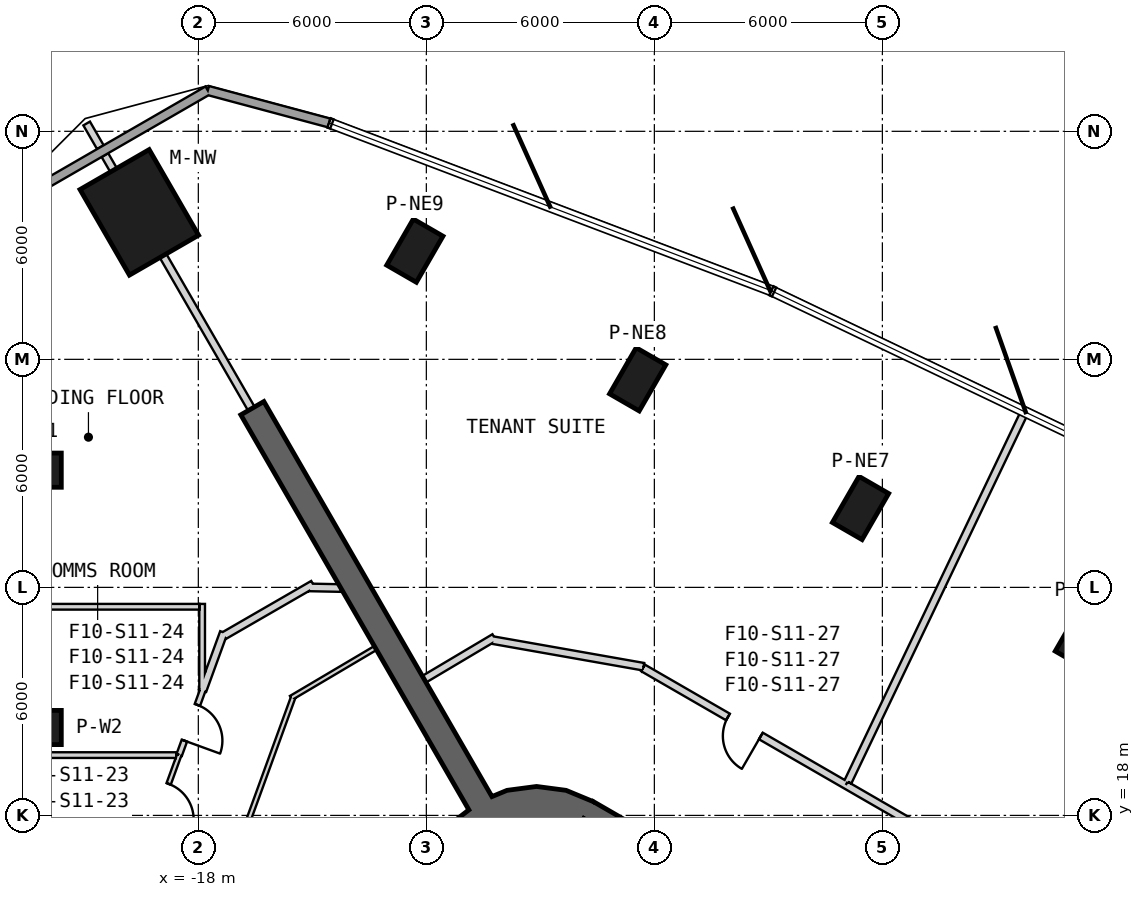
"""IFC4 building model, lengths in metres.
Left out: names, types, materials, properties, quantities, classifications, styles, units other than length and angle.
Written with IfcOpenShell. Run it as: python <this file> out.ifc"""

import sys

from ifc_helpers import new_model, si_unit, direction, frame, frame_2d, origin, origin_2d, place, context, subcontext, project, spatial, polyline, rectangle, outline, extrude, element, fill, save


model = new_model("IFC4")
c1 = context("Model", 3, precision=1e-05, world=origin(), true_north=direction((0.0, 1.0)))
c2 = subcontext(c1, "Body", "Model", "MODEL_VIEW")
j1 = project(units=[si_unit("LENGTHUNIT", "METRE"), si_unit("PLANEANGLEUNIT", "RADIAN")], contexts=[c1])
p1 = place(None, origin())
s1 = spatial("IfcSite", under=j1, at=p1, CompositionType="ELEMENT")
p2 = place(p1, origin())
s2 = spatial("IfcBuilding", under=s1, at=p2, CompositionType="ELEMENT")
p3 = place(p2, frame((0.0, 0.0, 193.2)))
s3 = spatial("IfcBuildingStorey", under=s2, at=p3, CompositionType="ELEMENT", Elevation=193.2)
p4 = place(p3, frame((-19.553, 33.867, 0.0), z_axis=(0.0, 0.0, 1.0), x_axis=(-0.5, 0.866025403784, 0.0)))
e1 = element("IfcColumn", 1, at=p4, inside=s3, PredefinedType="COLUMN", context=c2, shape_type="SweptSolid", body=[
    extrude(rectangle(XDim=2.6, YDim=2.1, at=origin_2d()), origin(), (0.0, 0.0, 1.0), 4.0),
])
for number, where, z_axis, x_axis in (
    (2, (-22.306, 27.084, 0.0), (0.0, 0.0, 1.0), (-1.0, 0.0, 0.0)),
    (3, (-22.306, 20.313, 0.0), (0.0, 0.0, 1.0), (-1.0, 0.0, 0.0)),
    (4, (5.289, 22.703, 0.0), (0.0, 0.0, 1.0), (0.5, 0.866, 0.0)),
    (5, (-0.575, 26.088, 0.0), (0.0, 0.0, 1.0), (0.5, 0.866, 0.0)),
    (6, (-6.439, 29.474, 0.0), (0.0, 0.0, 1.0), (0.5, 0.866, 0.0)),
    (7, (-12.302, 32.859, 0.0), (0.0, 0.0, 1.0), (0.5, 0.866, 0.0)),
):
    element("IfcColumn", number, at=place(p3, frame(where, z_axis=z_axis, x_axis=x_axis)), inside=s3, PredefinedType="COLUMN", context=c2, shape_type="SweptSolid", body=[
        extrude(rectangle(XDim=1.4, YDim=0.9, at=origin_2d()), origin(), (0.0, 0.0, 1.0), 4.0),
    ])
p5 = place(p3, frame((19.475, 2.208, 0.0), z_axis=(0.0, 0.0, 1.0), x_axis=(-0.866028369851, 0.499994862586, 0.0)))
e8 = element("IfcWall", 8, at=p5, inside=s3, PredefinedType="SHEAR", context=c2, shape_type="SweptSolid", body=[
    extrude(rectangle(XDim=31.523, YDim=0.9, at=frame_2d((15.762, 0.0))), origin(), (0.0, 0.0, 1.0), 4.0),
])
p6 = place(p5, frame((7.062, 0.0, 0.0)))
e9 = element("IfcOpeningElement", 9, at=p6, cuts=e8, PredefinedType="OPENING", context=c2, shape_type="SweptSolid", body=[
    extrude(rectangle(XDim=1.2, YDim=2.4, at=frame_2d((0.6, 1.2))), frame((0.0, 0.46, 0.0), z_axis=(0.0, -1.0, 0.0), x_axis=(1.0, 0.0, 0.0)), (0.0, 0.0, 1.0), 0.92),
])
p7 = place(p5, frame((3.612, 0.0, 0.0)))
e10 = element("IfcOpeningElement", 10, at=p7, cuts=e8, PredefinedType="OPENING", context=c2, shape_type="SweptSolid", body=[
    extrude(rectangle(XDim=1.2, YDim=2.4, at=frame_2d((0.6, 1.2))), frame((0.0, 0.46, 0.0), z_axis=(0.0, -1.0, 0.0), x_axis=(1.0, 0.0, 0.0)), (0.0, 0.0, 1.0), 0.92),
])
p8 = place(p5, frame((26.712, 0.0, 0.0)))
e11 = element("IfcOpeningElement", 11, at=p8, cuts=e8, PredefinedType="OPENING", context=c2, shape_type="SweptSolid", body=[
    extrude(rectangle(XDim=1.2, YDim=2.4, at=frame_2d((0.6, 1.2))), frame((0.0, 0.46, 0.0), z_axis=(0.0, -1.0, 0.0), x_axis=(1.0, 0.0, 0.0)), (0.0, 0.0, 1.0), 0.92),
])
p9 = place(p3, origin())
e12 = element("IfcWall", 12, at=p9, inside=s3, PredefinedType="SHEAR", context=c2, shape_type="SweptSolid", body=[
    extrude(outline(polyline([(-7.6, 18.36), (-8.323, 18.659), (-9.1, 18.762), (-9.876, 18.659), (-10.6, 18.36), (-11.221, 17.883), (-11.698, 17.262), (-11.998, 16.538), (-12.1, 15.762), (-11.2, 15.762), (-11.128, 16.305), (-10.919, 16.812), (-10.585, 17.247), (-10.15, 17.58), (-9.644, 17.79), (-9.1, 17.862), (-8.556, 17.79), (-8.05, 17.58), (-7.6, 18.36)])), origin(), (0.0, 0.0, 1.0), 4.0),
])
p10 = place(p3, frame((-10.575, 18.316, 0.0), z_axis=(0.0, 0.0, 1.0), x_axis=(-0.500001138955, 0.866024746207, 0.0)))
e13 = element("IfcWall", 13, at=p10, inside=s3, PredefinedType="SHEAR", context=c2, shape_type="SweptSolid", body=[
    extrude(rectangle(XDim=12.007, YDim=0.7, at=frame_2d((6.003, 0.0))), origin(), (0.0, 0.0, 1.0), 4.0),
])
p11 = place(p3, frame((-14.56, 36.221, 0.0), z_axis=(0.0, 0.0, 1.0), x_axis=(-0.965922648034, 0.258830906222, 0.0)))
e14 = element("IfcWall", 14, at=p11, inside=s3, PredefinedType="SOLIDWALL", context=c2, shape_type="SweptSolid", body=[
    extrude(rectangle(XDim=3.303, YDim=0.24, at=frame_2d((1.652, 0.0))), origin(), (0.0, 0.0, 1.0), 3.7),
])
p12 = place(p3, frame((-17.751, 37.076, 0.0), z_axis=(0.0, 0.0, 1.0), x_axis=(-0.86602503047, -0.5000006466, 0.0)))
e15 = element("IfcWall", 15, at=p12, inside=s3, PredefinedType="SOLIDWALL", context=c2, shape_type="SweptSolid", body=[
    extrude(rectangle(XDim=6.331, YDim=0.24, at=frame_2d((3.165, 0.0))), origin(), (0.0, 0.0, 1.0), 3.7),
])
p13 = place(p3, frame((-13.339, 22.405, 0.0), z_axis=(0.0, 0.0, 1.0), x_axis=(-0.86070028932, -0.509111983718, 0.0)))
e16 = element("IfcWall", 16, at=p13, inside=s3, PredefinedType="PARTITIONING", context=c2, shape_type="SweptSolid", body=[
    extrude(rectangle(XDim=2.579, YDim=0.12, at=frame_2d((1.29, 0.0))), origin(), (0.0, 0.0, 1.0), 3.7),
])
p14 = place(p3, frame((-15.506, 21.103, 0.0), z_axis=(0.0, 0.0, 1.0), x_axis=(-0.342017079535, -0.939693735909, 0.0)))
e17 = element("IfcWall", 17, at=p14, inside=s3, PredefinedType="PARTITIONING", context=c2, shape_type="SweptSolid", body=[
    extrude(rectangle(XDim=4.721, YDim=0.12, at=frame_2d((2.361, 0.0))), origin(), (0.0, 0.0, 1.0), 2.78),
])
p15 = place(p3, frame((-17.331, 22.814, 0.0), z_axis=(0.0, 0.0, 1.0), x_axis=(-0.342055959579, -0.939679583963, 0.0)))
e18 = element("IfcWall", 18, at=p15, inside=s3, PredefinedType="PARTITIONING", context=c2, shape_type="SweptSolid", body=[
    extrude(rectangle(XDim=1.629, YDim=0.2, at=frame_2d((0.814, 0.0))), origin(), (0.0, 0.0, 1.0), 2.78),
])
p16 = place(p3, frame((-14.98, 24.083, 0.0), z_axis=(0.0, 0.0, 1.0), x_axis=(-0.866008795918, -0.500028764566, 0.0)))
e19 = element("IfcWall", 19, at=p16, inside=s3, PredefinedType="PARTITIONING", context=c2, shape_type="SweptSolid", body=[
    extrude(rectangle(XDim=2.714, YDim=0.2, at=frame_2d((1.357, 0.0))), origin(), (0.0, 0.0, 1.0), 3.7),
])
p17 = place(p3, frame((-14.25, 23.982, 0.0), z_axis=(0.0, 0.0, 1.0), x_axis=(-0.999799129767, 0.02004245786, 0.0)))
e20 = element("IfcWall", 20, at=p17, inside=s3, PredefinedType="PARTITIONING", context=c2, shape_type="SweptSolid", body=[
    extrude(rectangle(XDim=0.841, YDim=0.2, at=frame_2d((0.42, 0.0))), origin(), (0.0, 0.0, 1.0), 3.7),
])
p18 = place(p3, frame((-18.503, 19.591, 0.0), z_axis=(0.0, 0.0, 1.0), x_axis=(-0.342051467618, -0.939681219085, 0.0)))
e21 = element("IfcWall", 21, at=p18, inside=s3, PredefinedType="PARTITIONING", context=c2, shape_type="SweptSolid", body=[
    extrude(rectangle(XDim=2.733, YDim=0.12, at=frame_2d((1.366, 0.0))), origin(), (0.0, 0.0, 1.0), 2.88),
])
p19 = place(p18, frame((0.811, 0.0, 0.0)))
e22 = element("IfcOpeningElement", 22, at=p19, cuts=e21, PredefinedType="OPENING", context=c2, shape_type="SweptSolid", body=[
    extrude(rectangle(XDim=1.0, YDim=2.1, at=frame_2d((0.5, 1.05))), frame((0.0, 0.07, 0.0), z_axis=(0.0, -1.0, 0.0), x_axis=(1.0, 0.0, 0.0)), (0.0, 0.0, 1.0), 0.14),
])
p20 = place(p3, frame((-17.888, 21.283, 0.0), z_axis=(0.0, 0.0, 1.0), x_axis=(-0.341939006975, -0.939722148036, 0.0)))
e23 = element("IfcWall", 23, at=p20, inside=s3, PredefinedType="PLUMBINGWALL", context=c2, shape_type="SweptSolid", body=[
    extrude(rectangle(XDim=1.801, YDim=0.15, at=frame_2d((0.9, 0.0))), origin(), (0.0, 0.0, 1.0), 3.7),
])
p21 = place(p20, frame((0.4, 0.0, 0.0)))
e24 = element("IfcOpeningElement", 24, at=p21, cuts=e23, PredefinedType="OPENING", context=c2, shape_type="SweptSolid", body=[
    extrude(rectangle(XDim=1.0, YDim=2.1, at=frame_2d((0.5, 1.05))), frame((0.0, 0.085, 0.0), z_axis=(0.0, -1.0, 0.0), x_axis=(1.0, 0.0, 0.0)), (0.0, 0.0, 1.0), 0.17),
])
p22 = place(p3, frame((-10.21, 22.681, 0.0), z_axis=(0.0, 0.0, 1.0), x_axis=(-0.859700405816, -0.510798602425, 0.0)))
e25 = element("IfcWall", 25, at=p22, inside=s3, PredefinedType="PARTITIONING", context=c2, shape_type="SweptSolid", body=[
    extrude(rectangle(XDim=2.149, YDim=0.2, at=frame_2d((1.074, 0.0))), origin(), (0.0, 0.0, 1.0), 3.7),
])
p23 = place(p3, frame((-6.285, 21.913, 0.0), z_axis=(0.0, 0.0, 1.0), x_axis=(-0.984806073034, 0.173657705026, 0.0)))
e26 = element("IfcWall", 26, at=p23, inside=s3, PredefinedType="PARTITIONING", context=c2, shape_type="SweptSolid", body=[
    extrude(rectangle(XDim=4.038, YDim=0.2, at=frame_2d((2.019, 0.0))), origin(), (0.0, 0.0, 1.0), 2.78),
])
p24 = place(p3, frame((9.675, 12.658, 0.0), z_axis=(0.0, 0.0, 1.0), x_axis=(-0.866018456403, 0.500012033024, 0.0)))
e27 = element("IfcWall", 27, at=p24, inside=s3, PredefinedType="PARTITIONING", context=c2, shape_type="SweptSolid", body=[
    extrude(rectangle(XDim=12.285, YDim=0.2, at=frame_2d((6.143, 0.0))), origin(), (0.0, 0.0, 1.0), 2.98),
])
p25 = place(p3, frame((-0.964, 18.801, 0.0), z_axis=(0.0, 0.0, 1.0), x_axis=(-0.866039032844, 0.499976393034, 0.0)))
e28 = element("IfcWall", 28, at=p25, inside=s3, PredefinedType="PARTITIONING", context=c2, shape_type="SweptSolid", body=[
    extrude(rectangle(XDim=6.158, YDim=0.2, at=frame_2d((3.079, 0.0))), origin(), (0.0, 0.0, 1.0), 2.88),
])
p26 = place(p25, frame((2.579, 0.0, 0.0)))
e29 = element("IfcOpeningElement", 29, at=p26, cuts=e28, PredefinedType="OPENING", context=c2, shape_type="SweptSolid", body=[
    extrude(rectangle(XDim=1.0, YDim=2.1, at=frame_2d((0.5, 1.05))), frame((0.0, 0.11, 0.0), z_axis=(0.0, -1.0, 0.0), x_axis=(1.0, 0.0, 0.0)), (0.0, 0.0, 1.0), 0.22),
])
p27 = place(p3, frame((-20.938, 36.206, 0.0), z_axis=(0.0, 0.0, 1.0), x_axis=(0.49996696679, -0.866044474677, 0.0)))
e30 = element("IfcWall", 30, at=p27, inside=s3, PredefinedType="PARTITIONING", context=c2, shape_type="SweptSolid", body=[
    extrude(rectangle(XDim=0.72, YDim=0.2, at=frame_2d((0.36, 0.0))), origin(), (0.0, 0.0, 1.0), 3.7),
])
p28 = place(p3, frame((-20.458, 35.375, 0.0), z_axis=(0.0, 0.0, 1.0), x_axis=(0.500384246316, -0.865803445384, 0.0)))
e31 = element("IfcWall", 31, at=p28, inside=s3, PredefinedType="PARTITIONING", context=c2, shape_type="SweptSolid", body=[
    extrude(rectangle(XDim=0.458, YDim=0.2, at=frame_2d((0.229, 0.0))), origin(), (0.0, 0.0, 1.0), 3.7),
])
p29 = place(p3, frame((-18.929, 32.727, 0.0), z_axis=(0.0, 0.0, 1.0), x_axis=(0.500007271693, -0.86602120543, 0.0)))
e32 = element("IfcWall", 32, at=p29, inside=s3, PredefinedType="PARTITIONING", context=c2, shape_type="SweptSolid", body=[
    extrude(rectangle(XDim=4.65, YDim=0.2, at=frame_2d((2.325, 0.0))), origin(), (0.0, 0.0, 1.0), 3.27),
])
p30 = place(p3, frame((-17.9, 21.265, 0.0), z_axis=(0.0, 0.0, 1.0), x_axis=(0.0, 1.0, 0.0)))
e33 = element("IfcWall", 33, at=p30, inside=s3, PredefinedType="PLUMBINGWALL", context=c2, shape_type="SweptSolid", body=[
    extrude(rectangle(XDim=2.3, YDim=0.15, at=frame_2d((1.15, 0.0))), origin(), (0.0, 0.0, 1.0), 2.78),
])
p31 = place(p3, frame((-17.975, 23.49, 0.0), z_axis=(0.0, 0.0, 1.0), x_axis=(-1.0, 0.0, 0.0)))
e34 = element("IfcWall", 34, at=p31, inside=s3, PredefinedType="PLUMBINGWALL", context=c2, shape_type="SweptSolid", body=[
    extrude(rectangle(XDim=5.5, YDim=0.15, at=frame_2d((2.75, 0.0))), origin(), (0.0, 0.0, 1.0), 2.78),
])
p32 = place(p3, frame((-0.906, 18.883, 0.0), z_axis=(0.0, 0.0, 1.0), x_axis=(0.431079223671, 0.90231408219, 0.0)))
e35 = element("IfcWall", 35, at=p32, inside=s3, PredefinedType="PARTITIONING", context=c2, shape_type="SweptSolid", body=[
    extrude(rectangle(XDim=10.792, YDim=0.2, at=frame_2d((5.396, 0.0))), origin(), (0.0, 0.0, 1.0), 2.98),
])
p33 = place(p3, frame((-23.3, 19.587, 0.0), z_axis=(0.0, 0.0, 1.0), x_axis=(1.0, 0.0, 0.0)))
e36 = element("IfcWall", 36, at=p33, inside=s3, PredefinedType="PLUMBINGWALL", context=c2, shape_type="SweptSolid", body=[
    extrude(rectangle(XDim=4.731, YDim=0.15, at=frame_2d((2.365, 0.0))), origin(), (0.0, 0.0, 1.0), 2.88),
])
p34 = place(p19, origin())
e37 = element("IfcDoor", 37, at=p34, inside=s3, OperationType="SINGLE_SWING_RIGHT", PredefinedType="NOTDEFINED", context=c2, shape_type="SweptSolid", body=[
    extrude(rectangle(XDim=1.0, YDim=2.1, at=frame_2d((0.5, 1.05))), frame((0.0, 0.025, 0.0), z_axis=(0.0, -1.0, 0.0), x_axis=(1.0, 0.0, 0.0)), (0.0, 0.0, 1.0), 0.05),
])
fill(e22, e37)
p35 = place(p21, origin())
e38 = element("IfcDoor", 38, at=p35, inside=s3, OperationType="SINGLE_SWING_LEFT", PredefinedType="USERDEFINED", context=c2, shape_type="SweptSolid", body=[
    extrude(rectangle(XDim=1.0, YDim=2.1, at=frame_2d((0.5, 1.05))), frame((0.0, 0.025, 0.0), z_axis=(0.0, -1.0, 0.0), x_axis=(1.0, 0.0, 0.0)), (0.0, 0.0, 1.0), 0.05),
])
fill(e24, e38)
p36 = place(p26, origin())
e39 = element("IfcDoor", 39, at=p36, inside=s3, OperationType="SINGLE_SWING_RIGHT", PredefinedType="USERDEFINED", context=c2, shape_type="SweptSolid", body=[
    extrude(rectangle(XDim=1.0, YDim=2.1, at=frame_2d((0.5, 1.05))), frame((0.0, 0.025, 0.0), z_axis=(0.0, -1.0, 0.0), x_axis=(1.0, 0.0, 0.0)), (0.0, 0.0, 1.0), 0.05),
])
fill(e29, e39)
save(model, sys.argv[1])
